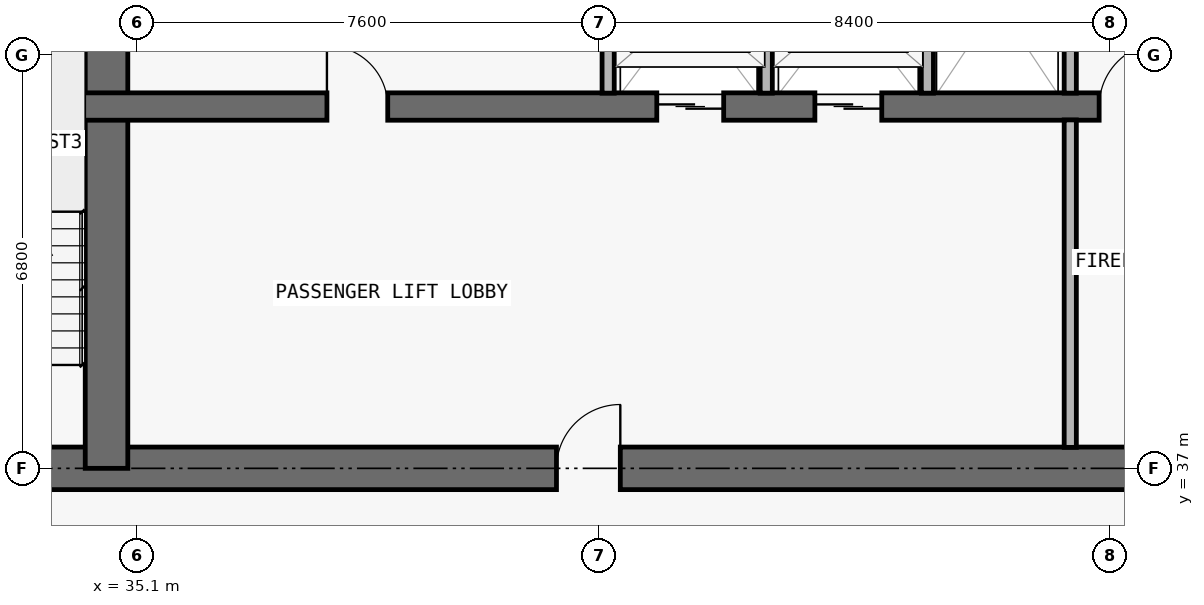
"""IFC4 building model, lengths in metres.
Left out: names, types, materials, properties, quantities, classifications, styles, units other than length and angle.
Written with IfcOpenShell. Run it as: python <this file> out.ifc"""

import sys

from ifc_helpers import new_model, si_unit, direction, frame, frame_2d, origin, place, context, subcontext, project, spatial, rectangle, extrude, element, fill, save


model = new_model("IFC4")
c1 = context("Model", 3, precision=1e-05, world=origin(), true_north=direction((0.0, 1.0)))
c2 = subcontext(c1, "Body", "Model", "MODEL_VIEW")
j1 = project(units=[si_unit("LENGTHUNIT", "METRE"), si_unit("PLANEANGLEUNIT", "RADIAN")], contexts=[c1])
p1 = place(None, origin())
s1 = spatial("IfcSite", under=j1, at=p1, CompositionType="ELEMENT")
p2 = place(p1, origin())
s2 = spatial("IfcBuilding", under=s1, at=p2, CompositionType="ELEMENT")
p3 = place(p2, frame((0.0, 0.0, 170.4)))
s3 = spatial("IfcBuildingStorey", under=s2, at=p3, CompositionType="ELEMENT", Elevation=170.4)
p4 = place(p3, frame((17.95, 37.0, 0.0), z_axis=(0.0, 0.0, 1.0), x_axis=(1.0, 0.0, 0.0)))
e1 = element("IfcWall", 1, at=p4, inside=s3, PredefinedType="SHEAR", context=c2, shape_type="SweptSolid", body=[
    extrude(rectangle(XDim=41.9, YDim=0.7, at=frame_2d((20.95, 0.0))), origin(), (0.0, 0.0, 1.0), 3.05),
])
p5 = place(p4, frame((14.35, 0.0, 0.0)))
e2 = element("IfcOpeningElement", 2, at=p5, cuts=e1, PredefinedType="OPENING", context=c2, shape_type="SweptSolid", body=[
    extrude(rectangle(XDim=1.1, YDim=2.15, at=frame_2d((0.55, 1.075))), frame((0.0, 0.36, 0.0), z_axis=(0.0, -1.0, 0.0), x_axis=(1.0, 0.0, 0.0)), (0.0, 0.0, 1.0), 0.72),
])
p6 = place(p4, frame((6.2, 0.0, 0.0)))
e3 = element("IfcOpeningElement", 3, at=p6, cuts=e1, PredefinedType="OPENING", context=c2, shape_type="SweptSolid", body=[
    extrude(rectangle(XDim=1.05, YDim=2.15, at=frame_2d((0.525, 1.075))), frame((0.0, 0.36, 0.0), z_axis=(0.0, -1.0, 0.0), x_axis=(1.0, 0.0, 0.0)), (0.0, 0.0, 1.0), 0.72),
])
p7 = place(p4, frame((34.7, 0.0, 0.0)))
e4 = element("IfcOpeningElement", 4, at=p7, cuts=e1, PredefinedType="OPENING", context=c2, shape_type="SweptSolid", body=[
    extrude(rectangle(XDim=1.05, YDim=2.15, at=frame_2d((0.525, 1.075))), frame((0.0, 0.36, 0.0), z_axis=(0.0, -1.0, 0.0), x_axis=(1.0, 0.0, 0.0)), (0.0, 0.0, 1.0), 0.72),
])
p8 = place(p4, frame((10.812, 0.0, 0.0)))
e5 = element("IfcOpeningElement", 5, at=p8, cuts=e1, PredefinedType="OPENING", context=c2, shape_type="SweptSolid", body=[
    extrude(rectangle(XDim=1.05, YDim=2.15, at=frame_2d((0.525, 1.075))), frame((0.0, 0.36, 0.0), z_axis=(0.0, -1.0, 0.0), x_axis=(1.0, 0.0, 0.0)), (0.0, 0.0, 1.0), 0.72),
])
p9 = place(p4, frame((24.05, 0.0, 0.0)))
e6 = element("IfcOpeningElement", 6, at=p9, cuts=e1, PredefinedType="OPENING", context=c2, shape_type="SweptSolid", body=[
    extrude(rectangle(XDim=1.05, YDim=2.15, at=frame_2d((0.525, 1.075))), frame((0.0, 0.36, 0.0), z_axis=(0.0, -1.0, 0.0), x_axis=(1.0, 0.0, 0.0)), (0.0, 0.0, 1.0), 0.72),
])
p10 = place(p3, frame((34.6, 37.0, 0.0), z_axis=(0.0, 0.0, 1.0), x_axis=(0.0, 1.0, 0.0)))
e7 = element("IfcWall", 7, at=p10, inside=s3, PredefinedType="SHEAR", context=c2, shape_type="SweptSolid", body=[
    extrude(rectangle(XDim=9.575, YDim=0.7, at=frame_2d((4.788, 0.0))), origin(), (0.0, 0.0, 1.0), 3.05),
])
p11 = place(p3, frame((22.25, 42.95, 0.0), z_axis=(0.0, 0.0, 1.0), x_axis=(1.0, 0.0, 0.0)))
e8 = element("IfcWall", 8, at=p11, inside=s3, PredefinedType="SHEAR", context=c2, shape_type="SweptSolid", body=[
    extrude(rectangle(XDim=33.3, YDim=0.45, at=frame_2d((16.65, 0.0))), origin(), (0.0, 0.0, 1.0), 3.05),
])
p12 = place(p11, frame((1.05, 0.0, 0.0)))
e9 = element("IfcOpeningElement", 9, at=p12, cuts=e8, PredefinedType="OPENING", context=c2, shape_type="SweptSolid", body=[
    extrude(rectangle(XDim=1.2, YDim=2.2, at=frame_2d((0.6, 1.1))), frame((0.0, 0.235, 0.0), z_axis=(0.0, -1.0, 0.0), x_axis=(1.0, 0.0, 0.0)), (0.0, 0.0, 1.0), 0.47),
])
p13 = place(p11, frame((31.05, 0.0, 0.0)))
e10 = element("IfcOpeningElement", 10, at=p13, cuts=e8, PredefinedType="OPENING", context=c2, shape_type="SweptSolid", body=[
    extrude(rectangle(XDim=1.2, YDim=2.2, at=frame_2d((0.6, 1.1))), frame((0.0, 0.235, 0.0), z_axis=(0.0, -1.0, 0.0), x_axis=(1.0, 0.0, 0.0)), (0.0, 0.0, 1.0), 0.47),
])
p14 = place(p11, frame((21.4, 0.0, 0.0)))
e11 = element("IfcOpeningElement", 11, at=p14, cuts=e8, PredefinedType="OPENING", context=c2, shape_type="SweptSolid", body=[
    extrude(rectangle(XDim=1.1, YDim=2.2, at=frame_2d((0.55, 1.1))), frame((0.0, 0.235, 0.0), z_axis=(0.0, -1.0, 0.0), x_axis=(1.0, 0.0, 0.0)), (0.0, 0.0, 1.0), 0.47),
])
p15 = place(p11, frame((24.0, 0.0, 0.0)))
e12 = element("IfcOpeningElement", 12, at=p15, cuts=e8, PredefinedType="OPENING", context=c2, shape_type="SweptSolid", body=[
    extrude(rectangle(XDim=1.1, YDim=2.2, at=frame_2d((0.55, 1.1))), frame((0.0, 0.235, 0.0), z_axis=(0.0, -1.0, 0.0), x_axis=(1.0, 0.0, 0.0)), (0.0, 0.0, 1.0), 0.47),
])
p16 = place(p11, frame((3.625, 0.0, 0.0)))
e13 = element("IfcOpeningElement", 13, at=p16, cuts=e8, PredefinedType="OPENING", context=c2, shape_type="SweptSolid", body=[
    extrude(rectangle(XDim=1.05, YDim=2.15, at=frame_2d((0.525, 1.075))), frame((0.0, 0.235, 0.0), z_axis=(0.0, -1.0, 0.0), x_axis=(1.0, 0.0, 0.0)), (0.0, 0.0, 1.0), 0.47),
])
p17 = place(p11, frame((28.675, 0.0, 0.0)))
e14 = element("IfcOpeningElement", 14, at=p17, cuts=e8, PredefinedType="OPENING", context=c2, shape_type="SweptSolid", body=[
    extrude(rectangle(XDim=1.05, YDim=2.15, at=frame_2d((0.525, 1.075))), frame((0.0, 0.235, 0.0), z_axis=(0.0, -1.0, 0.0), x_axis=(1.0, 0.0, 0.0)), (0.0, 0.0, 1.0), 0.47),
])
p18 = place(p11, frame((15.975, 0.0, 0.0)))
e15 = element("IfcOpeningElement", 15, at=p18, cuts=e8, PredefinedType="OPENING", context=c2, shape_type="SweptSolid", body=[
    extrude(rectangle(XDim=1.0, YDim=2.2, at=frame_2d((0.5, 1.1))), frame((0.0, 0.235, 0.0), z_axis=(0.0, -1.0, 0.0), x_axis=(1.0, 0.0, 0.0)), (0.0, 0.0, 1.0), 0.47),
])
for number, where, z_axis, x_axis in (
    (16, (42.85, 43.17, 0.0), (0.0, 0.0, 1.0), (0.0, 1.0, 0.0)),
    (17, (45.45, 43.17, 0.0), (0.0, 0.0, 1.0), (0.0, 1.0, 0.0)),
    (18, (48.1, 43.17, 0.0), (0.0, 0.0, 1.0), (0.0, 1.0, 0.0)),
):
    element("IfcWall", number, at=place(p3, frame(where, z_axis=z_axis, x_axis=x_axis)), inside=s3, PredefinedType="PARTITIONING", context=c2, shape_type="SweptSolid", body=[
        extrude(rectangle(XDim=3.185, YDim=0.2, at=frame_2d((1.593, 0.0))), origin(), (0.0, 0.0, 1.0), 3.05),
    ])
p19 = place(p3, frame((50.45, 37.345, 0.0), z_axis=(0.0, 0.0, 1.0), x_axis=(0.0, 1.0, 0.0)))
e19 = element("IfcWall", 19, at=p19, inside=s3, PredefinedType="PARTITIONING", context=c2, shape_type="SweptSolid", body=[
    extrude(rectangle(XDim=5.385, YDim=0.2, at=frame_2d((2.692, 0.0))), origin(), (0.0, 0.0, 1.0), 3.05),
])
p20 = place(p3, frame((50.45, 43.17, 0.0), z_axis=(0.0, 0.0, 1.0), x_axis=(0.0, 1.0, 0.0)))
e20 = element("IfcWall", 20, at=p20, inside=s3, PredefinedType="PARTITIONING", context=c2, shape_type="SweptSolid", body=[
    extrude(rectangle(XDim=3.185, YDim=0.2, at=frame_2d((1.593, 0.0))), origin(), (0.0, 0.0, 1.0), 3.05),
])
p21 = place(p14, origin())
e21 = element("IfcDoor", 21, at=p21, inside=s3, OperationType="DOUBLE_DOOR_SLIDING", PredefinedType="DOOR", context=c2, shape_type="SweptSolid", body=[
    extrude(rectangle(XDim=1.1, YDim=2.2, at=frame_2d((0.55, 1.1))), frame((0.0, 0.025, 0.0), z_axis=(0.0, -1.0, 0.0), x_axis=(1.0, 0.0, 0.0)), (0.0, 0.0, 1.0), 0.05),
])
fill(e11, e21)
p22 = place(p15, origin())
e22 = element("IfcDoor", 22, at=p22, inside=s3, OperationType="DOUBLE_DOOR_SLIDING", PredefinedType="DOOR", context=c2, shape_type="SweptSolid", body=[
    extrude(rectangle(XDim=1.1, YDim=2.2, at=frame_2d((0.55, 1.1))), frame((0.0, 0.025, 0.0), z_axis=(0.0, -1.0, 0.0), x_axis=(1.0, 0.0, 0.0)), (0.0, 0.0, 1.0), 0.05),
])
fill(e12, e22)
p23 = place(p17, origin())
e23 = element("IfcDoor", 23, at=p23, inside=s3, OperationType="SINGLE_SWING_RIGHT", PredefinedType="DOOR", context=c2, shape_type="SweptSolid", body=[
    extrude(rectangle(XDim=1.05, YDim=2.15, at=frame_2d((0.525, 1.075))), frame((0.0, 0.025, 0.0), z_axis=(0.0, -1.0, 0.0), x_axis=(1.0, 0.0, 0.0)), (0.0, 0.0, 1.0), 0.05),
])
fill(e14, e23)
p24 = place(p9, origin())
e24 = element("IfcDoor", 24, at=p24, inside=s3, OperationType="SINGLE_SWING_RIGHT", PredefinedType="DOOR", context=c2, shape_type="SweptSolid", body=[
    extrude(rectangle(XDim=1.05, YDim=2.15, at=frame_2d((0.525, 1.075))), frame((0.0, 0.025, 0.0), z_axis=(0.0, -1.0, 0.0), x_axis=(1.0, 0.0, 0.0)), (0.0, 0.0, 1.0), 0.05),
])
fill(e6, e24)
p25 = place(p18, origin())
e25 = element("IfcDoor", 25, at=p25, inside=s3, OperationType="SINGLE_SWING_LEFT", PredefinedType="DOOR", context=c2, shape_type="SweptSolid", body=[
    extrude(rectangle(XDim=1.0, YDim=2.2, at=frame_2d((0.5, 1.1))), frame((0.0, 0.025, 0.0), z_axis=(0.0, -1.0, 0.0), x_axis=(1.0, 0.0, 0.0)), (0.0, 0.0, 1.0), 0.05),
])
fill(e15, e25)
save(model, sys.argv[1])
